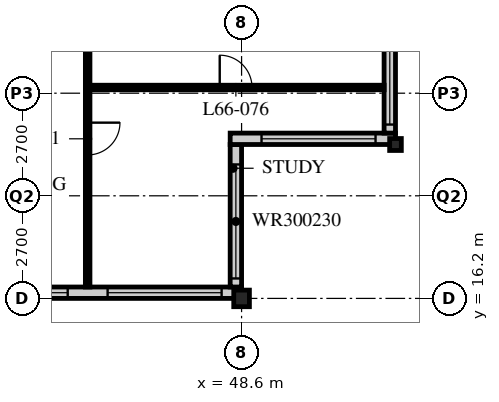
"""IFC4 building model, lengths in metres.
Left out: names, types, materials, properties, quantities, classifications, styles, units other than length and angle.
Written with IfcOpenShell. Run it as: python <this file> out.ifc"""

import sys

from ifc_helpers import new_model, si_unit, direction, frame, frame_2d, origin, origin_2d, place, context, subcontext, project, spatial, rectangle, i_section, extrude, element, fill, save


model = new_model("IFC4")
c1 = context("Model", 3, precision=1e-05, world=origin(), true_north=direction((0.0, 1.0)))
c2 = subcontext(c1, "Body", "Model", "MODEL_VIEW")
j1 = project(units=[si_unit("LENGTHUNIT", "METRE"), si_unit("PLANEANGLEUNIT", "RADIAN")], contexts=[c1])
p1 = place(None, origin())
s1 = spatial("IfcSite", under=j1, at=p1, CompositionType="ELEMENT")
p2 = place(p1, origin())
s2 = spatial("IfcBuilding", under=s1, at=p2, CompositionType="ELEMENT")
p3 = place(p2, frame((0.0, 0.0, 258.0)))
s3 = spatial("IfcBuildingStorey", under=s2, at=p3, CompositionType="ELEMENT", Elevation=258.0)
p4 = place(p3, frame((48.6, 16.2, 0.0), z_axis=(0.0, 0.0, 1.0), x_axis=(1.0, 0.0, 0.0)))
e1 = element("IfcColumn", 1, at=p4, inside=s3, PredefinedType="COLUMN", context=c2, shape_type="SweptSolid", body=[
    extrude(i_section(OverallWidth=0.412, OverallDepth=0.437, WebThickness=0.036, FlangeThickness=0.058, FilletRadius=0.015, at=origin_2d()), origin(), (0.0, 0.0, 1.0), 3.9),
])
p5 = place(p3, frame((52.65, 20.25, 0.0), z_axis=(0.0, 0.0, 1.0), x_axis=(1.0, 0.0, 0.0)))
e2 = element("IfcColumn", 2, at=p5, inside=s3, PredefinedType="COLUMN", context=c2, shape_type="SweptSolid", body=[
    extrude(i_section(OverallWidth=0.307, OverallDepth=0.314, WebThickness=0.012, FlangeThickness=0.019, FilletRadius=0.015, at=origin_2d()), origin(), (0.0, 0.0, 1.0), 3.9),
])
p6 = place(p3, frame((8.4, 16.35, 0.0), z_axis=(0.0, 0.0, 1.0), x_axis=(1.0, 0.0, 0.0)))
e3 = element("IfcWall", 3, at=p6, inside=s3, PredefinedType="SOLIDWALL", context=c2, shape_type="SweptSolid", body=[
    extrude(rectangle(XDim=40.2, YDim=0.3, at=frame_2d((20.1, 0.0))), origin(), (0.0, 0.0, 1.0), 3.69),
])
p7 = place(p6, frame((0.225, 0.0, 0.6)))
e4 = element("IfcOpeningElement", 4, at=p7, cuts=e3, PredefinedType="OPENING", context=c2, shape_type="SweptSolid", body=[
    extrude(rectangle(XDim=3.0, YDim=2.4, at=frame_2d((1.5, 1.2))), frame((0.0, 0.16, 0.0), z_axis=(0.0, -1.0, 0.0), x_axis=(1.0, 0.0, 0.0)), (0.0, 0.0, 1.0), 0.32),
])
p8 = place(p6, frame((4.275, 0.0, 0.6)))
e5 = element("IfcOpeningElement", 5, at=p8, cuts=e3, PredefinedType="OPENING", context=c2, shape_type="SweptSolid", body=[
    extrude(rectangle(XDim=3.0, YDim=2.4, at=frame_2d((1.5, 1.2))), frame((0.0, 0.16, 0.0), z_axis=(0.0, -1.0, 0.0), x_axis=(1.0, 0.0, 0.0)), (0.0, 0.0, 1.0), 0.32),
])
p9 = place(p6, frame((8.325, 0.0, 0.6)))
e6 = element("IfcOpeningElement", 6, at=p9, cuts=e3, PredefinedType="OPENING", context=c2, shape_type="SweptSolid", body=[
    extrude(rectangle(XDim=3.0, YDim=2.4, at=frame_2d((1.5, 1.2))), frame((0.0, 0.16, 0.0), z_axis=(0.0, -1.0, 0.0), x_axis=(1.0, 0.0, 0.0)), (0.0, 0.0, 1.0), 0.32),
])
p10 = place(p6, frame((12.375, 0.0, 0.6)))
e7 = element("IfcOpeningElement", 7, at=p10, cuts=e3, PredefinedType="OPENING", context=c2, shape_type="SweptSolid", body=[
    extrude(rectangle(XDim=3.0, YDim=2.4, at=frame_2d((1.5, 1.2))), frame((0.0, 0.16, 0.0), z_axis=(0.0, -1.0, 0.0), x_axis=(1.0, 0.0, 0.0)), (0.0, 0.0, 1.0), 0.32),
])
p11 = place(p6, frame((16.425, 0.0, 0.6)))
e8 = element("IfcOpeningElement", 8, at=p11, cuts=e3, PredefinedType="OPENING", context=c2, shape_type="SweptSolid", body=[
    extrude(rectangle(XDim=3.0, YDim=2.4, at=frame_2d((1.5, 1.2))), frame((0.0, 0.16, 0.0), z_axis=(0.0, -1.0, 0.0), x_axis=(1.0, 0.0, 0.0)), (0.0, 0.0, 1.0), 0.32),
])
p12 = place(p6, frame((20.475, 0.0, 0.6)))
e9 = element("IfcOpeningElement", 9, at=p12, cuts=e3, PredefinedType="OPENING", context=c2, shape_type="SweptSolid", body=[
    extrude(rectangle(XDim=3.0, YDim=2.4, at=frame_2d((1.5, 1.2))), frame((0.0, 0.16, 0.0), z_axis=(0.0, -1.0, 0.0), x_axis=(1.0, 0.0, 0.0)), (0.0, 0.0, 1.0), 0.32),
])
p13 = place(p6, frame((24.525, 0.0, 0.6)))
e10 = element("IfcOpeningElement", 10, at=p13, cuts=e3, PredefinedType="OPENING", context=c2, shape_type="SweptSolid", body=[
    extrude(rectangle(XDim=3.0, YDim=2.4, at=frame_2d((1.5, 1.2))), frame((0.0, 0.16, 0.0), z_axis=(0.0, -1.0, 0.0), x_axis=(1.0, 0.0, 0.0)), (0.0, 0.0, 1.0), 0.32),
])
p14 = place(p6, frame((28.575, 0.0, 0.6)))
e11 = element("IfcOpeningElement", 11, at=p14, cuts=e3, PredefinedType="OPENING", context=c2, shape_type="SweptSolid", body=[
    extrude(rectangle(XDim=3.0, YDim=2.4, at=frame_2d((1.5, 1.2))), frame((0.0, 0.16, 0.0), z_axis=(0.0, -1.0, 0.0), x_axis=(1.0, 0.0, 0.0)), (0.0, 0.0, 1.0), 0.32),
])
p15 = place(p6, frame((32.625, 0.0, 0.6)))
e12 = element("IfcOpeningElement", 12, at=p15, cuts=e3, PredefinedType="OPENING", context=c2, shape_type="SweptSolid", body=[
    extrude(rectangle(XDim=3.0, YDim=2.4, at=frame_2d((1.5, 1.2))), frame((0.0, 0.16, 0.0), z_axis=(0.0, -1.0, 0.0), x_axis=(1.0, 0.0, 0.0)), (0.0, 0.0, 1.0), 0.32),
])
p16 = place(p6, frame((36.675, 0.0, 0.6)))
e13 = element("IfcOpeningElement", 13, at=p16, cuts=e3, PredefinedType="OPENING", context=c2, shape_type="SweptSolid", body=[
    extrude(rectangle(XDim=3.0, YDim=2.4, at=frame_2d((1.5, 1.2))), frame((0.0, 0.16, 0.0), z_axis=(0.0, -1.0, 0.0), x_axis=(1.0, 0.0, 0.0)), (0.0, 0.0, 1.0), 0.32),
])
p17 = place(p3, frame((48.45, 16.5, 0.0), z_axis=(0.0, 0.0, 1.0), x_axis=(0.0, 1.0, 0.0)))
e14 = element("IfcWall", 14, at=p17, inside=s3, PredefinedType="SOLIDWALL", context=c2, shape_type="SweptSolid", body=[
    extrude(rectangle(XDim=3.75, YDim=0.3, at=frame_2d((1.875, 0.0))), origin(), (0.0, 0.0, 1.0), 3.69),
])
p18 = place(p17, frame((0.225, 0.0, 0.6)))
e15 = element("IfcOpeningElement", 15, at=p18, cuts=e14, PredefinedType="OPENING", context=c2, shape_type="SweptSolid", body=[
    extrude(rectangle(XDim=3.0, YDim=2.3, at=frame_2d((1.5, 1.15))), frame((0.0, 0.16, 0.0), z_axis=(0.0, -1.0, 0.0), x_axis=(1.0, 0.0, 0.0)), (0.0, 0.0, 1.0), 0.32),
])
p19 = place(p3, frame((48.3, 20.4, 0.0), z_axis=(0.0, 0.0, 1.0), x_axis=(1.0, 0.0, 0.0)))
e16 = element("IfcWall", 16, at=p19, inside=s3, PredefinedType="SOLIDWALL", context=c2, shape_type="SweptSolid", body=[
    extrude(rectangle(XDim=4.35, YDim=0.3, at=frame_2d((2.175, 0.0))), origin(), (0.0, 0.0, 1.0), 3.69),
])
p20 = place(p19, frame((0.825, 0.0, 0.6)))
e17 = element("IfcOpeningElement", 17, at=p20, cuts=e16, PredefinedType="OPENING", context=c2, shape_type="SweptSolid", body=[
    extrude(rectangle(XDim=3.0, YDim=2.3, at=frame_2d((1.5, 1.15))), frame((0.0, 0.16, 0.0), z_axis=(0.0, -1.0, 0.0), x_axis=(1.0, 0.0, 0.0)), (0.0, 0.0, 1.0), 0.32),
])
p21 = place(p3, frame((52.5, 20.55, 0.0), z_axis=(0.0, 0.0, 1.0), x_axis=(0.0, 1.0, 0.0)))
e18 = element("IfcWall", 18, at=p21, inside=s3, PredefinedType="SOLIDWALL", context=c2, shape_type="SweptSolid", body=[
    extrude(rectangle(XDim=3.75, YDim=0.3, at=frame_2d((1.875, 0.0))), origin(), (0.0, 0.0, 1.0), 3.69),
])
p22 = place(p21, frame((0.225, 0.0, 0.6)))
e19 = element("IfcOpeningElement", 19, at=p22, cuts=e18, PredefinedType="OPENING", context=c2, shape_type="SweptSolid", body=[
    extrude(rectangle(XDim=3.0, YDim=2.3, at=frame_2d((1.5, 1.15))), frame((0.0, 0.16, 0.0), z_axis=(0.0, -1.0, 0.0), x_axis=(1.0, 0.0, 0.0)), (0.0, 0.0, 1.0), 0.32),
])
p23 = place(p3, frame((44.55, 16.5, 0.0), z_axis=(0.0, 0.0, 1.0), x_axis=(0.0, 1.0, 0.0)))
e20 = element("IfcWall", 20, at=p23, inside=s3, PredefinedType="PARTITIONING", context=c2, shape_type="SweptSolid", body=[
    extrude(rectangle(XDim=7.8, YDim=0.12, at=frame_2d((3.9, 0.0))), origin(), (0.0, 0.0, 1.0), 3.69),
])
p24 = place(p23, frame((3.475, 0.0, 0.0)))
e21 = element("IfcOpeningElement", 21, at=p24, cuts=e20, PredefinedType="OPENING", context=c2, shape_type="SweptSolid", body=[
    extrude(rectangle(XDim=0.85, YDim=2.1, at=frame_2d((0.425, 1.05))), frame((0.0, 0.07, 0.0), z_axis=(0.0, -1.0, 0.0), x_axis=(1.0, 0.0, 0.0)), (0.0, 0.0, 1.0), 0.14),
])
p25 = place(p3, frame((44.55, 21.75, 0.0), z_axis=(0.0, 0.0, 1.0), x_axis=(1.0, 0.0, 0.0)))
e22 = element("IfcWall", 22, at=p25, inside=s3, PredefinedType="PARTITIONING", context=c2, shape_type="SweptSolid", body=[
    extrude(rectangle(XDim=7.8, YDim=0.12, at=frame_2d((3.9, 0.0))), origin(), (0.0, 0.0, 1.0), 3.69),
])
p26 = place(p25, frame((3.475, 0.0, 0.0)))
e23 = element("IfcOpeningElement", 23, at=p26, cuts=e22, PredefinedType="OPENING", context=c2, shape_type="SweptSolid", body=[
    extrude(rectangle(XDim=0.85, YDim=2.1, at=frame_2d((0.425, 1.05))), frame((0.0, 0.07, 0.0), z_axis=(0.0, -1.0, 0.0), x_axis=(1.0, 0.0, 0.0)), (0.0, 0.0, 1.0), 0.14),
])
p27 = place(p15, origin())
e24 = element("IfcWindow", 24, at=p27, inside=s3, PartitioningType="SINGLE_PANEL", PredefinedType="WINDOW", context=c2, shape_type="SweptSolid", body=[
    extrude(rectangle(XDim=3.0, YDim=2.4, at=frame_2d((1.5, 1.2))), frame((0.0, 0.03, 0.0), z_axis=(0.0, -1.0, 0.0), x_axis=(1.0, 0.0, 0.0)), (0.0, 0.0, 1.0), 0.06),
])
fill(e12, e24)
p28 = place(p16, origin())
e25 = element("IfcWindow", 25, at=p28, inside=s3, PartitioningType="SINGLE_PANEL", PredefinedType="WINDOW", context=c2, shape_type="SweptSolid", body=[
    extrude(rectangle(XDim=3.0, YDim=2.4, at=frame_2d((1.5, 1.2))), frame((0.0, 0.03, 0.0), z_axis=(0.0, -1.0, 0.0), x_axis=(1.0, 0.0, 0.0)), (0.0, 0.0, 1.0), 0.06),
])
fill(e13, e25)
p29 = place(p18, origin())
e26 = element("IfcWindow", 26, at=p29, inside=s3, PartitioningType="SINGLE_PANEL", PredefinedType="WINDOW", context=c2, shape_type="SweptSolid", body=[
    extrude(rectangle(XDim=3.0, YDim=2.3, at=frame_2d((1.5, 1.15))), frame((0.0, 0.03, 0.0), z_axis=(0.0, -1.0, 0.0), x_axis=(1.0, 0.0, 0.0)), (0.0, 0.0, 1.0), 0.06),
])
fill(e15, e26)
p30 = place(p20, origin())
e27 = element("IfcWindow", 27, at=p30, inside=s3, PartitioningType="SINGLE_PANEL", PredefinedType="WINDOW", context=c2, shape_type="SweptSolid", body=[
    extrude(rectangle(XDim=3.0, YDim=2.3, at=frame_2d((1.5, 1.15))), frame((0.0, 0.03, 0.0), z_axis=(0.0, -1.0, 0.0), x_axis=(1.0, 0.0, 0.0)), (0.0, 0.0, 1.0), 0.06),
])
fill(e17, e27)
p31 = place(p22, origin())
e28 = element("IfcWindow", 28, at=p31, inside=s3, PartitioningType="SINGLE_PANEL", PredefinedType="WINDOW", context=c2, shape_type="SweptSolid", body=[
    extrude(rectangle(XDim=3.0, YDim=2.3, at=frame_2d((1.5, 1.15))), frame((0.0, 0.03, 0.0), z_axis=(0.0, -1.0, 0.0), x_axis=(1.0, 0.0, 0.0)), (0.0, 0.0, 1.0), 0.06),
])
fill(e19, e28)
p32 = place(p24, origin())
e29 = element("IfcDoor", 29, at=p32, inside=s3, OperationType="SINGLE_SWING_LEFT", PredefinedType="DOOR", context=c2, shape_type="SweptSolid", body=[
    extrude(rectangle(XDim=0.85, YDim=2.1, at=frame_2d((0.425, 1.05))), frame((0.0, 0.025, 0.0), z_axis=(0.0, -1.0, 0.0), x_axis=(1.0, 0.0, 0.0)), (0.0, 0.0, 1.0), 0.05),
])
fill(e21, e29)
p33 = place(p26, origin())
e30 = element("IfcDoor", 30, at=p33, inside=s3, OperationType="SINGLE_SWING_LEFT", PredefinedType="DOOR", context=c2, shape_type="SweptSolid", body=[
    extrude(rectangle(XDim=0.85, YDim=2.1, at=frame_2d((0.425, 1.05))), frame((0.0, 0.025, 0.0), z_axis=(0.0, -1.0, 0.0), x_axis=(1.0, 0.0, 0.0)), (0.0, 0.0, 1.0), 0.05),
])
fill(e23, e30)
save(model, sys.argv[1])
